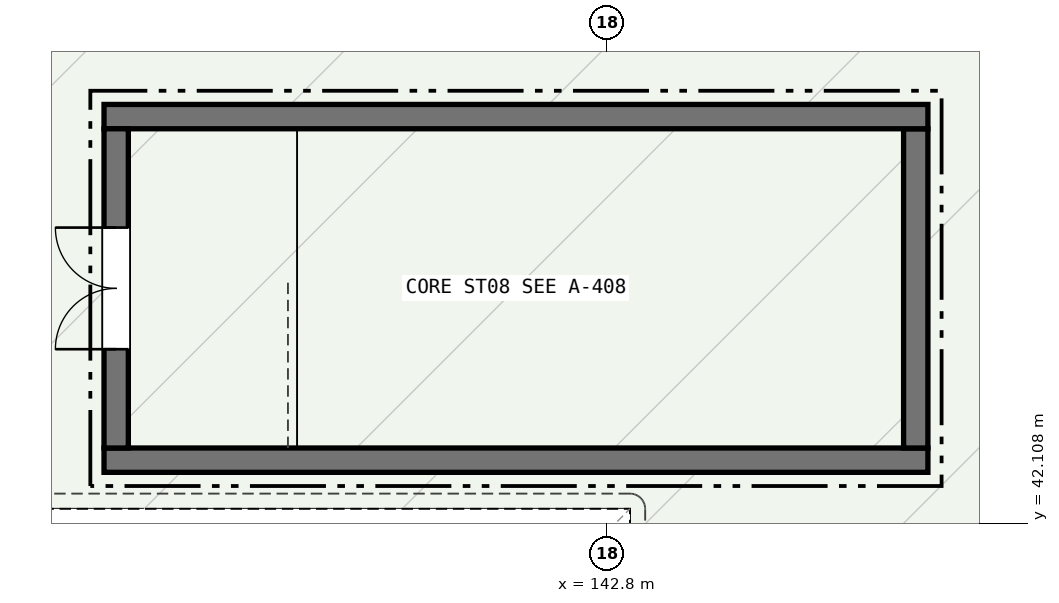
"""IFC4 building model, lengths in metres.
Left out: names, types, materials, properties, quantities, classifications, styles, units other than length and angle.
Written with IfcOpenShell. Run it as: python <this file> out.ifc"""

import sys

from ifc_helpers import new_model, si_unit, direction, frame, frame_2d, origin, origin_2d, place, context, subcontext, project, spatial, rectangle, i_section, extrude, element, fill, save


model = new_model("IFC4")
c1 = context("Model", 3, precision=1e-05, world=origin(), true_north=direction((0.0, 1.0)))
c2 = subcontext(c1, "Body", "Model", "MODEL_VIEW")
j1 = project(units=[si_unit("LENGTHUNIT", "METRE"), si_unit("PLANEANGLEUNIT", "RADIAN")], contexts=[c1])
p1 = place(None, origin())
s1 = spatial("IfcSite", under=j1, at=p1, CompositionType="ELEMENT")
p2 = place(p1, origin())
s2 = spatial("IfcBuilding", under=s1, at=p2, CompositionType="ELEMENT")
p3 = place(p2, frame((0.0, 0.0, 21.6)))
s3 = spatial("IfcBuildingStorey", under=s2, at=p3, CompositionType="ELEMENT", Elevation=21.6)
p4 = place(p3, frame((142.8, 42.0, 5.1), z_axis=(0.0, 0.0, 1.0), x_axis=(1.0, 0.0, 0.0)))
e1 = element("IfcColumn", 1, at=p4, inside=s3, PredefinedType="COLUMN", context=c2, shape_type="SweptSolid", body=[
    extrude(i_section(OverallWidth=0.25, OverallDepth=0.25, WebThickness=0.009, FlangeThickness=0.014, FilletRadius=0.016, at=origin_2d()), origin(), (0.0, 0.0, 1.0), 4.2),
])
p5 = place(p2, frame((0.0, 0.0, 26.7)))
s4 = spatial("IfcBuildingStorey", under=s2, at=p5, CompositionType="ELEMENT", Elevation=26.7)
p6 = place(p5, frame((136.18, 42.94, 0.0), z_axis=(0.0, 0.0, 1.0), x_axis=(1.0, 0.0, 0.0)))
e2 = element("IfcWall", 2, at=p6, inside=s4, PredefinedType="SHEAR", context=c2, shape_type="SweptSolid", body=[
    extrude(rectangle(XDim=10.84, YDim=0.32, at=frame_2d((5.42, 0.0))), origin(), (0.0, 0.0, 1.0), 3.2),
])
p7 = place(p5, frame((146.86, 43.1, 0.0), z_axis=(0.0, 0.0, 1.0), x_axis=(0.0, 1.0, 0.0)))
e3 = element("IfcWall", 3, at=p7, inside=s4, PredefinedType="SHEAR", context=c2, shape_type="SweptSolid", body=[
    extrude(rectangle(XDim=4.2, YDim=0.32, at=frame_2d((2.1, 0.0))), origin(), (0.0, 0.0, 1.0), 3.2),
])
p8 = place(p5, frame((147.02, 47.46, 0.0), z_axis=(0.0, 0.0, 1.0), x_axis=(-1.0, 0.0, 0.0)))
e4 = element("IfcWall", 4, at=p8, inside=s4, PredefinedType="SHEAR", context=c2, shape_type="SweptSolid", body=[
    extrude(rectangle(XDim=10.84, YDim=0.32, at=frame_2d((5.42, 0.0))), origin(), (0.0, 0.0, 1.0), 3.2),
])
p9 = place(p5, frame((136.34, 47.3, 0.0), z_axis=(0.0, 0.0, 1.0), x_axis=(0.0, -1.0, 0.0)))
e5 = element("IfcWall", 5, at=p9, inside=s4, PredefinedType="SHEAR", context=c2, shape_type="SweptSolid", body=[
    extrude(rectangle(XDim=4.2, YDim=0.32, at=frame_2d((2.1, 0.0))), origin(), (0.0, 0.0, 1.0), 3.2),
])
p10 = place(p9, frame((1.3, 0.0, 0.0)))
e6 = element("IfcOpeningElement", 6, at=p10, cuts=e5, PredefinedType="OPENING", context=c2, shape_type="SweptSolid", body=[
    extrude(rectangle(XDim=1.6, YDim=2.2, at=frame_2d((0.8, 1.1))), frame((0.0, 0.17, 0.0), z_axis=(0.0, -1.0, 0.0), x_axis=(1.0, 0.0, 0.0)), (0.0, 0.0, 1.0), 0.34),
])
p11 = place(p10, frame((1.6, 0.0, 0.0), z_axis=(0.0, 0.0, 1.0), x_axis=(-1.0, 0.0, 0.0)))
e7 = element("IfcDoor", 7, at=p11, inside=s4, OperationType="DOUBLE_DOOR_SINGLE_SWING", PredefinedType="DOOR", context=c2, shape_type="SweptSolid", body=[
    extrude(rectangle(XDim=1.6, YDim=2.2, at=frame_2d((0.8, 1.1))), frame((0.0, 0.025, 0.0), z_axis=(0.0, -1.0, 0.0), x_axis=(1.0, 0.0, 0.0)), (0.0, 0.0, 1.0), 0.05),
])
fill(e6, e7)
save(model, sys.argv[1])
